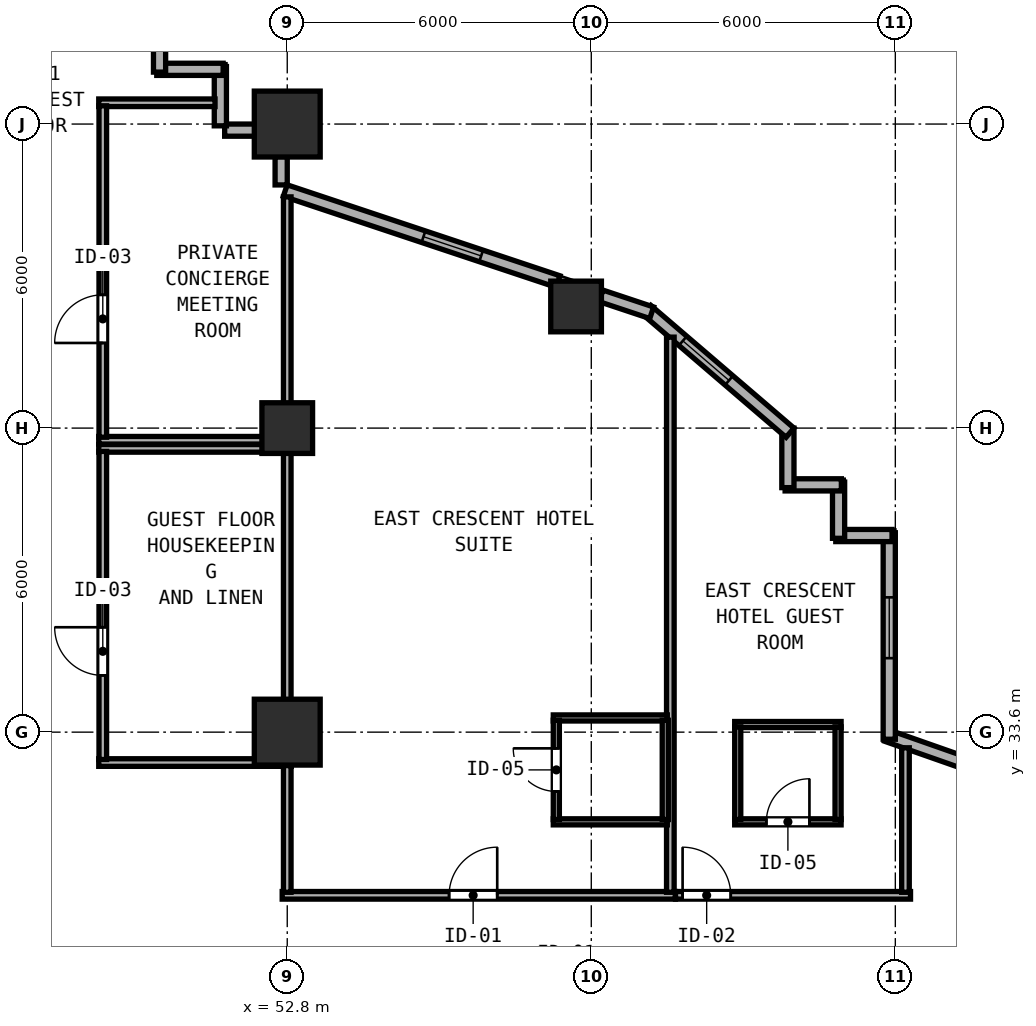
"""IFC4 building model, lengths in metres.
Left out: names, types, materials, properties, quantities, classifications, styles, units other than length and angle.
Written with IfcOpenShell. Run it as: python <this file> out.ifc"""

import sys

from ifc_helpers import new_model, si_unit, direction, frame, frame_2d, origin, origin_2d, place, context, subcontext, project, spatial, rectangle, hollow_rectangle, extrude, element, fill, save


model = new_model("IFC4")
c1 = context("Model", 3, precision=1e-05, world=origin(), true_north=direction((0.0, 1.0)))
c2 = subcontext(c1, "Body", "Model", "MODEL_VIEW")
j1 = project(units=[si_unit("LENGTHUNIT", "METRE"), si_unit("PLANEANGLEUNIT", "RADIAN")], contexts=[c1])
p1 = place(None, origin())
s1 = spatial("IfcSite", under=j1, at=p1, CompositionType="ELEMENT")
p2 = place(p1, origin())
s2 = spatial("IfcBuilding", under=s1, at=p2, CompositionType="ELEMENT")
p3 = place(p2, frame((0.0, 0.0, 31.6)))
s3 = spatial("IfcBuildingStorey", under=s2, at=p3, CompositionType="ELEMENT", Elevation=31.6)
for number, where, z_axis, x_axis in (
    (1, (52.8, 33.6, 0.0), (0.0, 0.0, 1.0), (1.0, 0.0, 0.0)),
    (2, (52.8, 45.6, 0.0), (0.0, 0.0, 1.0), (1.0, 0.0, 0.0)),
):
    element("IfcColumn", number, at=place(p3, frame(where, z_axis=z_axis, x_axis=x_axis)), inside=s3, PredefinedType="COLUMN", context=c2, shape_type="SweptSolid", body=[
        extrude(hollow_rectangle(XDim=1.3, YDim=1.3, WallThickness=0.048, at=origin_2d()), origin(), (0.0, 0.0, 1.0), 3.8),
    ])
for number, where, z_axis, x_axis in (
    (3, (52.8, 39.6, 0.0), (0.0, 0.0, 1.0), (1.0, 0.0, 0.0)),
    (4, (58.5, 42.0, 0.0), (0.0, 0.0, 1.0), (1.0, 0.0, 0.0)),
):
    element("IfcColumn", number, at=place(p3, frame(where, z_axis=z_axis, x_axis=x_axis)), inside=s3, PredefinedType="COLUMN", context=c2, shape_type="SweptSolid", body=[
        extrude(hollow_rectangle(XDim=1.0, YDim=1.0, WallThickness=0.038, at=origin_2d()), origin(), (0.0, 0.0, 1.0), 3.8),
    ])
p4 = place(p3, frame((71.624, 31.079, 0.0), z_axis=(0.0, 0.0, 1.0), x_axis=(-0.943600343117, 0.331086684222, 0.0)))
e5 = element("IfcWall", 5, at=p4, inside=s3, PredefinedType="SOLIDWALL", context=c2, shape_type="SweptSolid", body=[
    extrude(rectangle(XDim=7.414, YDim=0.24, at=frame_2d((3.707, 0.0))), origin(), (0.0, 0.0, 1.0), 3.6),
])
p5 = place(p4, frame((1.6, 0.0, 0.85)))
e6 = element("IfcOpeningElement", 6, at=p5, cuts=e5, PredefinedType="OPENING", context=c2, shape_type="SweptSolid", body=[
    extrude(rectangle(XDim=1.2, YDim=1.85, at=frame_2d((0.6, 0.925))), frame((0.0, 0.13, 0.0), z_axis=(0.0, -1.0, 0.0), x_axis=(1.0, 0.0, 0.0)), (0.0, 0.0, 1.0), 0.26),
])
p6 = place(p3, frame((64.68, 33.46, 0.0), z_axis=(0.0, 0.0, 1.0), x_axis=(0.0, 1.0, 0.0)))
e7 = element("IfcWall", 7, at=p6, inside=s3, PredefinedType="SOLIDWALL", context=c2, shape_type="SweptSolid", body=[
    extrude(rectangle(XDim=4.075, YDim=0.24, at=frame_2d((2.038, 0.0))), origin(), (0.0, 0.0, 1.0), 3.6),
])
p7 = place(p6, frame((1.6, 0.0, 0.85)))
e8 = element("IfcOpeningElement", 8, at=p7, cuts=e7, PredefinedType="OPENING", context=c2, shape_type="SweptSolid", body=[
    extrude(rectangle(XDim=1.2, YDim=1.85, at=frame_2d((0.6, 0.925))), frame((0.0, 0.13, 0.0), z_axis=(0.0, -1.0, 0.0), x_axis=(1.0, 0.0, 0.0)), (0.0, 0.0, 1.0), 0.26),
])
p8 = place(p3, frame((64.735, 37.48, 0.0), z_axis=(0.0, 0.0, 1.0), x_axis=(-1.0, 0.0, 0.0)))
e9 = element("IfcWall", 9, at=p8, inside=s3, PredefinedType="SOLIDWALL", context=c2, shape_type="SweptSolid", body=[
    extrude(rectangle(XDim=1.11, YDim=0.24, at=frame_2d((0.555, 0.0))), origin(), (0.0, 0.0, 1.0), 3.6),
])
p9 = place(p3, frame((63.68, 37.425, 0.0), z_axis=(0.0, 0.0, 1.0), x_axis=(0.0, 1.0, 0.0)))
e10 = element("IfcWall", 10, at=p9, inside=s3, PredefinedType="SOLIDWALL", context=c2, shape_type="SweptSolid", body=[
    extrude(rectangle(XDim=1.11, YDim=0.24, at=frame_2d((0.555, 0.0))), origin(), (0.0, 0.0, 1.0), 3.6),
])
p10 = place(p3, frame((63.735, 38.48, 0.0), z_axis=(0.0, 0.0, 1.0), x_axis=(-1.0, 0.0, 0.0)))
e11 = element("IfcWall", 11, at=p10, inside=s3, PredefinedType="SOLIDWALL", context=c2, shape_type="SweptSolid", body=[
    extrude(rectangle(XDim=1.11, YDim=0.24, at=frame_2d((0.555, 0.0))), origin(), (0.0, 0.0, 1.0), 3.6),
])
p11 = place(p3, frame((62.68, 38.425, 0.0), z_axis=(0.0, 0.0, 1.0), x_axis=(0.0, 1.0, 0.0)))
e12 = element("IfcWall", 12, at=p11, inside=s3, PredefinedType="SOLIDWALL", context=c2, shape_type="SweptSolid", body=[
    extrude(rectangle(XDim=1.175, YDim=0.24, at=frame_2d((0.587, 0.0))), origin(), (0.0, 0.0, 1.0), 3.6),
])
p12 = place(p3, frame((62.722, 39.509, 0.0), z_axis=(0.0, 0.0, 1.0), x_axis=(-0.759247334792, 0.650802185469, 0.0)))
e13 = element("IfcWall", 13, at=p12, inside=s3, PredefinedType="SOLIDWALL", context=c2, shape_type="SweptSolid", body=[
    extrude(rectangle(XDim=3.719, YDim=0.24, at=frame_2d((1.86, 0.0))), origin(), (0.0, 0.0, 1.0), 3.6),
])
p13 = place(p12, frame((1.586, 0.0, 0.85)))
e14 = element("IfcOpeningElement", 14, at=p13, cuts=e13, PredefinedType="OPENING", context=c2, shape_type="SweptSolid", body=[
    extrude(rectangle(XDim=1.2, YDim=1.85, at=frame_2d((0.6, 0.925))), frame((0.0, 0.13, 0.0), z_axis=(0.0, -1.0, 0.0), x_axis=(1.0, 0.0, 0.0)), (0.0, 0.0, 1.0), 0.26),
])
p14 = place(p3, frame((59.992, 41.876, 0.0), z_axis=(0.0, 0.0, 1.0), x_axis=(-0.948706457285, 0.316158279832, 0.0)))
e15 = element("IfcWall", 15, at=p14, inside=s3, PredefinedType="SOLIDWALL", context=c2, shape_type="SweptSolid", body=[
    extrude(rectangle(XDim=1.054, YDim=0.24, at=frame_2d((0.527, 0.0))), origin(), (0.0, 0.0, 1.0), 3.6),
])
p15 = place(p3, frame((58.145, 42.492, 0.0), z_axis=(0.0, 0.0, 1.0), x_axis=(-0.948683298051, 0.316227766017, 0.0)))
e16 = element("IfcWall", 16, at=p15, inside=s3, PredefinedType="SOLIDWALL", context=c2, shape_type="SweptSolid", body=[
    extrude(rectangle(XDim=5.675, YDim=0.24, at=frame_2d((2.838, 0.0))), origin(), (0.0, 0.0, 1.0), 3.097),
])
p16 = place(p15, frame((1.6, 0.0, 0.85)))
e17 = element("IfcOpeningElement", 17, at=p16, cuts=e16, PredefinedType="OPENING", context=c2, shape_type="SweptSolid", body=[
    extrude(rectangle(XDim=1.2, YDim=1.85, at=frame_2d((0.6, 0.925))), frame((0.0, 0.13, 0.0), z_axis=(0.0, -1.0, 0.0), x_axis=(1.0, 0.0, 0.0)), (0.0, 0.0, 1.0), 0.26),
])
p17 = place(p3, frame((52.68, 44.398, 0.0), z_axis=(0.0, 0.0, 1.0), x_axis=(0.0, 1.0, 0.0)))
e18 = element("IfcWall", 18, at=p17, inside=s3, PredefinedType="SOLIDWALL", context=c2, shape_type="SweptSolid", body=[
    extrude(rectangle(XDim=0.56, YDim=0.24, at=frame_2d((0.28, 0.0))), origin(), (0.0, 0.0, 1.0), 3.097),
])
p18 = place(p3, frame((52.158, 45.48, 0.0), z_axis=(0.0, 0.0, 1.0), x_axis=(-1.0, 0.0, 0.0)))
e19 = element("IfcWall", 19, at=p18, inside=s3, PredefinedType="SOLIDWALL", context=c2, shape_type="SweptSolid", body=[
    extrude(rectangle(XDim=0.593, YDim=0.24, at=frame_2d((0.296, 0.0))), origin(), (0.0, 0.0, 1.0), 3.6),
])
p19 = place(p3, frame((51.48, 45.565, 0.0), z_axis=(0.0, 0.0, 1.0), x_axis=(0.0, 1.0, 0.0)))
e20 = element("IfcWall", 20, at=p19, inside=s3, PredefinedType="SOLIDWALL", context=c2, shape_type="SweptSolid", body=[
    extrude(rectangle(XDim=1.17, YDim=0.24, at=frame_2d((0.585, 0.0))), origin(), (0.0, 0.0, 1.0), 3.6),
])
p20 = place(p3, frame((51.535, 46.68, 0.0), z_axis=(0.0, 0.0, 1.0), x_axis=(-1.0, 0.0, 0.0)))
e21 = element("IfcWall", 21, at=p20, inside=s3, PredefinedType="SOLIDWALL", context=c2, shape_type="SweptSolid", body=[
    extrude(rectangle(XDim=1.31, YDim=0.24, at=frame_2d((0.655, 0.0))), origin(), (0.0, 0.0, 1.0), 3.6),
])
p21 = place(p3, frame((50.28, 46.625, 0.0), z_axis=(0.0, 0.0, 1.0), x_axis=(0.0, 1.0, 0.0)))
e22 = element("IfcWall", 22, at=p21, inside=s3, PredefinedType="SOLIDWALL", context=c2, shape_type="SweptSolid", body=[
    extrude(rectangle(XDim=1.37, YDim=0.24, at=frame_2d((0.685, 0.0))), origin(), (0.0, 0.0, 1.0), 3.6),
])
for number, where, z_axis, x_axis in (
    (23, (49.08, 39.2, 0.0), (0.0, 0.0, 1.0), (1.0, 0.0, 0.0)),
    (24, (49.08, 33.0, 0.0), (0.0, 0.0, 1.0), (1.0, 0.0, 0.0)),
):
    element("IfcWall", number, at=place(p3, frame(where, z_axis=z_axis, x_axis=x_axis)), inside=s3, PredefinedType="PARTITIONING", context=c2, shape_type="SweptSolid", body=[
        extrude(rectangle(XDim=3.8, YDim=0.15, at=frame_2d((1.9, 0.0))), origin(), (0.0, 0.0, 1.0), 3.6),
    ])
p22 = place(p3, frame((49.16, 33.06, 0.0), z_axis=(0.0, 0.0, 1.0), x_axis=(0.0, 1.0, 0.0)))
e25 = element("IfcWall", 25, at=p22, inside=s3, PredefinedType="PARTITIONING", context=c2, shape_type="SweptSolid", body=[
    extrude(rectangle(XDim=6.08, YDim=0.15, at=frame_2d((3.04, 0.0))), origin(), (0.0, 0.0, 1.0), 3.6),
])
p23 = place(p22, frame((1.66, 0.0, 0.0)))
e26 = element("IfcOpeningElement", 26, at=p23, cuts=e25, PredefinedType="OPENING", context=c2, shape_type="SweptSolid", body=[
    extrude(rectangle(XDim=0.95, YDim=2.12, at=frame_2d((0.475, 1.06))), frame((0.0, 0.085, 0.0), z_axis=(0.0, -1.0, 0.0), x_axis=(1.0, 0.0, 0.0)), (0.0, 0.0, 1.0), 0.17),
])
p24 = place(p3, frame((52.8, 33.06, 0.0), z_axis=(0.0, 0.0, 1.0), x_axis=(0.0, 1.0, 0.0)))
e27 = element("IfcWall", 27, at=p24, inside=s3, PredefinedType="PARTITIONING", context=c2, shape_type="SweptSolid", body=[
    extrude(rectangle(XDim=6.08, YDim=0.15, at=frame_2d((3.04, 0.0))), origin(), (0.0, 0.0, 1.0), 3.097),
])
p25 = place(p3, frame((49.08, 46.02, 0.0), z_axis=(0.0, 0.0, 1.0), x_axis=(1.0, 0.0, 0.0)))
e28 = element("IfcWall", 28, at=p25, inside=s3, PredefinedType="PARTITIONING", context=c2, shape_type="SweptSolid", body=[
    extrude(rectangle(XDim=2.295, YDim=0.15, at=frame_2d((1.147, 0.0))), origin(), (0.0, 0.0, 1.0), 3.6),
])
p26 = place(p3, frame((49.08, 39.36, 0.0), z_axis=(0.0, 0.0, 1.0), x_axis=(1.0, 0.0, 0.0)))
e29 = element("IfcWall", 29, at=p26, inside=s3, PredefinedType="PARTITIONING", context=c2, shape_type="SweptSolid", body=[
    extrude(rectangle(XDim=3.8, YDim=0.15, at=frame_2d((1.9, 0.0))), origin(), (0.0, 0.0, 1.0), 3.6),
])
p27 = place(p3, frame((49.16, 39.42, 0.0), z_axis=(0.0, 0.0, 1.0), x_axis=(0.0, 1.0, 0.0)))
e30 = element("IfcWall", 30, at=p27, inside=s3, PredefinedType="PARTITIONING", context=c2, shape_type="SweptSolid", body=[
    extrude(rectangle(XDim=6.54, YDim=0.15, at=frame_2d((3.27, 0.0))), origin(), (0.0, 0.0, 1.0), 3.6),
])
p28 = place(p27, frame((1.86, 0.0, 0.0)))
e31 = element("IfcOpeningElement", 31, at=p28, cuts=e30, PredefinedType="OPENING", context=c2, shape_type="SweptSolid", body=[
    extrude(rectangle(XDim=0.95, YDim=2.12, at=frame_2d((0.475, 1.06))), frame((0.0, 0.085, 0.0), z_axis=(0.0, -1.0, 0.0), x_axis=(1.0, 0.0, 0.0)), (0.0, 0.0, 1.0), 0.17),
])
p29 = place(p3, frame((52.8, 39.42, 0.0), z_axis=(0.0, 0.0, 1.0), x_axis=(0.0, 1.0, 0.0)))
e32 = element("IfcWall", 32, at=p29, inside=s3, PredefinedType="PARTITIONING", context=c2, shape_type="SweptSolid", body=[
    extrude(rectangle(XDim=4.743, YDim=0.15, at=frame_2d((2.372, 0.0))), origin(), (0.0, 0.0, 1.0), 3.097),
])
p30 = place(p3, frame((52.7, 30.38, 0.0), z_axis=(0.0, 0.0, 1.0), x_axis=(1.0, 0.0, 0.0)))
e33 = element("IfcWall", 33, at=p30, inside=s3, PredefinedType="PARTITIONING", context=c2, shape_type="SweptSolid", body=[
    extrude(rectangle(XDim=7.76, YDim=0.15, at=frame_2d((3.88, 0.0))), origin(), (0.0, 0.0, 1.0), 3.6),
])
p31 = place(p30, frame((3.294, 0.0, 0.0)))
e34 = element("IfcOpeningElement", 34, at=p31, cuts=e33, PredefinedType="OPENING", context=c2, shape_type="SweptSolid", body=[
    extrude(rectangle(XDim=0.95, YDim=2.18, at=frame_2d((0.475, 1.09))), frame((0.0, 0.085, 0.0), z_axis=(0.0, -1.0, 0.0), x_axis=(1.0, 0.0, 0.0)), (0.0, 0.0, 1.0), 0.17),
])
p32 = place(p3, frame((52.8, 30.44, 0.0), z_axis=(0.0, 0.0, 1.0), x_axis=(0.0, 1.0, 0.0)))
e35 = element("IfcWall", 35, at=p32, inside=s3, PredefinedType="PARTITIONING", context=c2, shape_type="SweptSolid", body=[
    extrude(rectangle(XDim=2.5, YDim=0.15, at=frame_2d((1.25, 0.0))), origin(), (0.0, 0.0, 1.0), 3.097),
])
p33 = place(p3, frame((60.36, 30.44, 0.0), z_axis=(0.0, 0.0, 1.0), x_axis=(0.0, 1.0, 0.0)))
e36 = element("IfcWall", 36, at=p33, inside=s3, PredefinedType="PARTITIONING", context=c2, shape_type="SweptSolid", body=[
    extrude(rectangle(XDim=10.955, YDim=0.15, at=frame_2d((5.478, 0.0))), origin(), (0.0, 0.0, 1.0), 3.6),
])
for number, where, z_axis, x_axis in (
    (37, (58.05, 33.88, 0.0), (0.0, 0.0, 1.0), (1.0, 0.0, 0.0)),
    (38, (58.05, 31.83, 0.0), (0.0, 0.0, 1.0), (1.0, 0.0, 0.0)),
):
    element("IfcWall", number, at=place(p3, frame(where, z_axis=z_axis, x_axis=x_axis)), inside=s3, PredefinedType="PARTITIONING", context=c2, shape_type="SweptSolid", body=[
        extrude(rectangle(XDim=2.25, YDim=0.12, at=frame_2d((1.125, 0.0))), origin(), (0.0, 0.0, 1.0), 3.6),
    ])
p34 = place(p3, frame((58.11, 31.875, 0.0), z_axis=(0.0, 0.0, 1.0), x_axis=(0.0, 1.0, 0.0)))
e39 = element("IfcWall", 39, at=p34, inside=s3, PredefinedType="PARTITIONING", context=c2, shape_type="SweptSolid", body=[
    extrude(rectangle(XDim=1.96, YDim=0.12, at=frame_2d((0.98, 0.0))), origin(), (0.0, 0.0, 1.0), 3.6),
])
p35 = place(p34, frame((1.405, 0.0, 0.0), z_axis=(0.0, 0.0, 1.0), x_axis=(-1.0, 0.0, 0.0)))
e40 = element("IfcOpeningElement", 40, at=p35, cuts=e39, PredefinedType="OPENING", context=c2, shape_type="SweptSolid", body=[
    extrude(rectangle(XDim=0.85, YDim=2.1, at=frame_2d((0.425, 1.05))), frame((0.0, 0.07, 0.0), z_axis=(0.0, -1.0, 0.0), x_axis=(1.0, 0.0, 0.0)), (0.0, 0.0, 1.0), 0.14),
])
p36 = place(p3, frame((60.26, 31.875, 0.0), z_axis=(0.0, 0.0, 1.0), x_axis=(0.0, 1.0, 0.0)))
e41 = element("IfcWall", 41, at=p36, inside=s3, PredefinedType="PARTITIONING", context=c2, shape_type="SweptSolid", body=[
    extrude(rectangle(XDim=1.96, YDim=0.12, at=frame_2d((0.98, 0.0))), origin(), (0.0, 0.0, 1.0), 3.6),
])
p37 = place(p3, frame((60.462, 30.38, 0.0), z_axis=(0.0, 0.0, 1.0), x_axis=(1.0, 0.0, 0.0)))
e42 = element("IfcWall", 42, at=p37, inside=s3, PredefinedType="PARTITIONING", context=c2, shape_type="SweptSolid", body=[
    extrude(rectangle(XDim=4.638, YDim=0.15, at=frame_2d((2.319, 0.0))), origin(), (0.0, 0.0, 1.0), 3.6),
])
p38 = place(p37, frame((0.14, 0.0, 0.0)))
e43 = element("IfcOpeningElement", 43, at=p38, cuts=e42, PredefinedType="OPENING", context=c2, shape_type="SweptSolid", body=[
    extrude(rectangle(XDim=0.95, YDim=2.15, at=frame_2d((0.475, 1.075))), frame((0.0, 0.085, 0.0), z_axis=(0.0, -1.0, 0.0), x_axis=(1.0, 0.0, 0.0)), (0.0, 0.0, 1.0), 0.17),
])
p39 = place(p3, frame((65.0, 30.44, 0.0), z_axis=(0.0, 0.0, 1.0), x_axis=(0.0, 1.0, 0.0)))
e44 = element("IfcWall", 44, at=p39, inside=s3, PredefinedType="PARTITIONING", context=c2, shape_type="SweptSolid", body=[
    extrude(rectangle(XDim=2.851, YDim=0.15, at=frame_2d((1.426, 0.0))), origin(), (0.0, 0.0, 1.0), 3.6),
])
p40 = place(p3, frame((61.63, 33.75, 0.0), z_axis=(0.0, 0.0, 1.0), x_axis=(1.0, 0.0, 0.0)))
e45 = element("IfcWall", 45, at=p40, inside=s3, PredefinedType="PARTITIONING", context=c2, shape_type="SweptSolid", body=[
    extrude(rectangle(XDim=2.1, YDim=0.12, at=frame_2d((1.05, 0.0))), origin(), (0.0, 0.0, 1.0), 3.6),
])
p41 = place(p3, frame((61.63, 31.83, 0.0), z_axis=(0.0, 0.0, 1.0), x_axis=(1.0, 0.0, 0.0)))
e46 = element("IfcWall", 46, at=p41, inside=s3, PredefinedType="PARTITIONING", context=c2, shape_type="SweptSolid", body=[
    extrude(rectangle(XDim=2.1, YDim=0.12, at=frame_2d((1.05, 0.0))), origin(), (0.0, 0.0, 1.0), 3.6),
])
p42 = place(p41, frame((0.625, 0.0, 0.0)))
e47 = element("IfcOpeningElement", 47, at=p42, cuts=e46, PredefinedType="OPENING", context=c2, shape_type="SweptSolid", body=[
    extrude(rectangle(XDim=0.85, YDim=2.1, at=frame_2d((0.425, 1.05))), frame((0.0, 0.07, 0.0), z_axis=(0.0, -1.0, 0.0), x_axis=(1.0, 0.0, 0.0)), (0.0, 0.0, 1.0), 0.14),
])
for number, where, z_axis, x_axis in (
    (48, (61.69, 31.875, 0.0), (0.0, 0.0, 1.0), (0.0, 1.0, 0.0)),
    (49, (63.67, 31.875, 0.0), (0.0, 0.0, 1.0), (0.0, 1.0, 0.0)),
):
    element("IfcWall", number, at=place(p3, frame(where, z_axis=z_axis, x_axis=x_axis)), inside=s3, PredefinedType="PARTITIONING", context=c2, shape_type="SweptSolid", body=[
        extrude(rectangle(XDim=1.83, YDim=0.12, at=frame_2d((0.915, 0.0))), origin(), (0.0, 0.0, 1.0), 3.6),
    ])
p43 = place(p7, origin())
e50 = element("IfcWindow", 50, at=p43, inside=s3, PartitioningType="SINGLE_PANEL", PredefinedType="WINDOW", context=c2, shape_type="SweptSolid", body=[
    extrude(rectangle(XDim=1.2, YDim=1.85, at=frame_2d((0.6, 0.925))), frame((0.0, 0.03, 0.0), z_axis=(0.0, -1.0, 0.0), x_axis=(1.0, 0.0, 0.0)), (0.0, 0.0, 1.0), 0.06),
])
fill(e8, e50)
p44 = place(p13, origin())
e51 = element("IfcWindow", 51, at=p44, inside=s3, PartitioningType="SINGLE_PANEL", PredefinedType="WINDOW", context=c2, shape_type="SweptSolid", body=[
    extrude(rectangle(XDim=1.2, YDim=1.85, at=frame_2d((0.6, 0.925))), frame((0.0, 0.03, 0.0), z_axis=(0.0, -1.0, 0.0), x_axis=(1.0, 0.0, 0.0)), (0.0, 0.0, 1.0), 0.06),
])
fill(e14, e51)
p45 = place(p16, origin())
e52 = element("IfcWindow", 52, at=p45, inside=s3, PartitioningType="SINGLE_PANEL", PredefinedType="WINDOW", context=c2, shape_type="SweptSolid", body=[
    extrude(rectangle(XDim=1.2, YDim=1.85, at=frame_2d((0.6, 0.925))), frame((0.0, 0.03, 0.0), z_axis=(0.0, -1.0, 0.0), x_axis=(1.0, 0.0, 0.0)), (0.0, 0.0, 1.0), 0.06),
])
fill(e17, e52)
p46 = place(p23, origin())
e53 = element("IfcDoor", 53, at=p46, inside=s3, OperationType="SINGLE_SWING_RIGHT", PredefinedType="DOOR", context=c2, shape_type="SweptSolid", body=[
    extrude(rectangle(XDim=0.95, YDim=2.12, at=frame_2d((0.475, 1.06))), frame((0.0, 0.025, 0.0), z_axis=(0.0, -1.0, 0.0), x_axis=(1.0, 0.0, 0.0)), (0.0, 0.0, 1.0), 0.05),
])
fill(e26, e53)
p47 = place(p28, origin())
e54 = element("IfcDoor", 54, at=p47, inside=s3, OperationType="SINGLE_SWING_LEFT", PredefinedType="DOOR", context=c2, shape_type="SweptSolid", body=[
    extrude(rectangle(XDim=0.95, YDim=2.12, at=frame_2d((0.475, 1.06))), frame((0.0, 0.025, 0.0), z_axis=(0.0, -1.0, 0.0), x_axis=(1.0, 0.0, 0.0)), (0.0, 0.0, 1.0), 0.05),
])
fill(e31, e54)
p48 = place(p31, origin())
e55 = element("IfcDoor", 55, at=p48, inside=s3, OperationType="SINGLE_SWING_RIGHT", PredefinedType="DOOR", context=c2, shape_type="SweptSolid", body=[
    extrude(rectangle(XDim=0.95, YDim=2.18, at=frame_2d((0.475, 1.09))), frame((0.0, 0.025, 0.0), z_axis=(0.0, -1.0, 0.0), x_axis=(1.0, 0.0, 0.0)), (0.0, 0.0, 1.0), 0.05),
])
fill(e34, e55)
p49 = place(p35, origin())
e56 = element("IfcDoor", 56, at=p49, inside=s3, OperationType="SINGLE_SWING_LEFT", PredefinedType="DOOR", context=c2, shape_type="SweptSolid", body=[
    extrude(rectangle(XDim=0.85, YDim=2.1, at=frame_2d((0.425, 1.05))), frame((0.0, 0.025, 0.0), z_axis=(0.0, -1.0, 0.0), x_axis=(1.0, 0.0, 0.0)), (0.0, 0.0, 1.0), 0.05),
])
fill(e40, e56)
p50 = place(p38, origin())
e57 = element("IfcDoor", 57, at=p50, inside=s3, OperationType="SINGLE_SWING_LEFT", PredefinedType="DOOR", context=c2, shape_type="SweptSolid", body=[
    extrude(rectangle(XDim=0.95, YDim=2.15, at=frame_2d((0.475, 1.075))), frame((0.0, 0.025, 0.0), z_axis=(0.0, -1.0, 0.0), x_axis=(1.0, 0.0, 0.0)), (0.0, 0.0, 1.0), 0.05),
])
fill(e43, e57)
p51 = place(p42, origin())
e58 = element("IfcDoor", 58, at=p51, inside=s3, OperationType="SINGLE_SWING_RIGHT", PredefinedType="DOOR", context=c2, shape_type="SweptSolid", body=[
    extrude(rectangle(XDim=0.85, YDim=2.1, at=frame_2d((0.425, 1.05))), frame((0.0, 0.025, 0.0), z_axis=(0.0, -1.0, 0.0), x_axis=(1.0, 0.0, 0.0)), (0.0, 0.0, 1.0), 0.05),
])
fill(e47, e58)
save(model, sys.argv[1])
